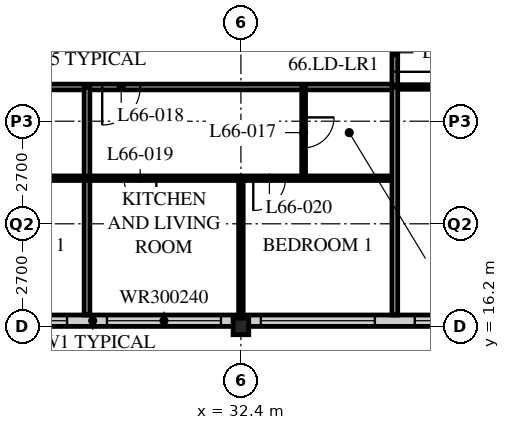
"""IFC4 building model, lengths in metres.
Left out: names, types, materials, properties, quantities, classifications, styles, units other than length and angle.
Written with IfcOpenShell. Run it as: python <this file> out.ifc"""

import sys

from ifc_helpers import new_model, si_unit, direction, frame, frame_2d, origin, origin_2d, place, context, subcontext, project, spatial, rectangle, i_section, extrude, element, fill, save


model = new_model("IFC4")
c1 = context("Model", 3, precision=1e-05, world=origin(), true_north=direction((0.0, 1.0)))
c2 = subcontext(c1, "Body", "Model", "MODEL_VIEW")
j1 = project(units=[si_unit("LENGTHUNIT", "METRE"), si_unit("PLANEANGLEUNIT", "RADIAN")], contexts=[c1])
p1 = place(None, origin())
s1 = spatial("IfcSite", under=j1, at=p1, CompositionType="ELEMENT")
p2 = place(p1, origin())
s2 = spatial("IfcBuilding", under=s1, at=p2, CompositionType="ELEMENT")
p3 = place(p2, frame((0.0, 0.0, 258.0)))
s3 = spatial("IfcBuildingStorey", under=s2, at=p3, CompositionType="ELEMENT", Elevation=258.0)
p4 = place(p3, frame((32.4, 16.2, 0.0), z_axis=(0.0, 0.0, 1.0), x_axis=(1.0, 0.0, 0.0)))
e1 = element("IfcColumn", 1, at=p4, inside=s3, PredefinedType="COLUMN", context=c2, shape_type="SweptSolid", body=[
    extrude(i_section(OverallWidth=0.412, OverallDepth=0.437, WebThickness=0.036, FlangeThickness=0.058, FilletRadius=0.015, at=origin_2d()), origin(), (0.0, 0.0, 1.0), 3.9),
])
p5 = place(p3, frame((8.4, 16.35, 0.0), z_axis=(0.0, 0.0, 1.0), x_axis=(1.0, 0.0, 0.0)))
e2 = element("IfcWall", 2, at=p5, inside=s3, PredefinedType="SOLIDWALL", context=c2, shape_type="SweptSolid", body=[
    extrude(rectangle(XDim=40.2, YDim=0.3, at=frame_2d((20.1, 0.0))), origin(), (0.0, 0.0, 1.0), 3.69),
])
p6 = place(p5, frame((0.225, 0.0, 0.6)))
e3 = element("IfcOpeningElement", 3, at=p6, cuts=e2, PredefinedType="OPENING", context=c2, shape_type="SweptSolid", body=[
    extrude(rectangle(XDim=3.0, YDim=2.4, at=frame_2d((1.5, 1.2))), frame((0.0, 0.16, 0.0), z_axis=(0.0, -1.0, 0.0), x_axis=(1.0, 0.0, 0.0)), (0.0, 0.0, 1.0), 0.32),
])
p7 = place(p5, frame((4.275, 0.0, 0.6)))
e4 = element("IfcOpeningElement", 4, at=p7, cuts=e2, PredefinedType="OPENING", context=c2, shape_type="SweptSolid", body=[
    extrude(rectangle(XDim=3.0, YDim=2.4, at=frame_2d((1.5, 1.2))), frame((0.0, 0.16, 0.0), z_axis=(0.0, -1.0, 0.0), x_axis=(1.0, 0.0, 0.0)), (0.0, 0.0, 1.0), 0.32),
])
p8 = place(p5, frame((8.325, 0.0, 0.6)))
e5 = element("IfcOpeningElement", 5, at=p8, cuts=e2, PredefinedType="OPENING", context=c2, shape_type="SweptSolid", body=[
    extrude(rectangle(XDim=3.0, YDim=2.4, at=frame_2d((1.5, 1.2))), frame((0.0, 0.16, 0.0), z_axis=(0.0, -1.0, 0.0), x_axis=(1.0, 0.0, 0.0)), (0.0, 0.0, 1.0), 0.32),
])
p9 = place(p5, frame((12.375, 0.0, 0.6)))
e6 = element("IfcOpeningElement", 6, at=p9, cuts=e2, PredefinedType="OPENING", context=c2, shape_type="SweptSolid", body=[
    extrude(rectangle(XDim=3.0, YDim=2.4, at=frame_2d((1.5, 1.2))), frame((0.0, 0.16, 0.0), z_axis=(0.0, -1.0, 0.0), x_axis=(1.0, 0.0, 0.0)), (0.0, 0.0, 1.0), 0.32),
])
p10 = place(p5, frame((16.425, 0.0, 0.6)))
e7 = element("IfcOpeningElement", 7, at=p10, cuts=e2, PredefinedType="OPENING", context=c2, shape_type="SweptSolid", body=[
    extrude(rectangle(XDim=3.0, YDim=2.4, at=frame_2d((1.5, 1.2))), frame((0.0, 0.16, 0.0), z_axis=(0.0, -1.0, 0.0), x_axis=(1.0, 0.0, 0.0)), (0.0, 0.0, 1.0), 0.32),
])
p11 = place(p5, frame((20.475, 0.0, 0.6)))
e8 = element("IfcOpeningElement", 8, at=p11, cuts=e2, PredefinedType="OPENING", context=c2, shape_type="SweptSolid", body=[
    extrude(rectangle(XDim=3.0, YDim=2.4, at=frame_2d((1.5, 1.2))), frame((0.0, 0.16, 0.0), z_axis=(0.0, -1.0, 0.0), x_axis=(1.0, 0.0, 0.0)), (0.0, 0.0, 1.0), 0.32),
])
p12 = place(p5, frame((24.525, 0.0, 0.6)))
e9 = element("IfcOpeningElement", 9, at=p12, cuts=e2, PredefinedType="OPENING", context=c2, shape_type="SweptSolid", body=[
    extrude(rectangle(XDim=3.0, YDim=2.4, at=frame_2d((1.5, 1.2))), frame((0.0, 0.16, 0.0), z_axis=(0.0, -1.0, 0.0), x_axis=(1.0, 0.0, 0.0)), (0.0, 0.0, 1.0), 0.32),
])
p13 = place(p5, frame((28.575, 0.0, 0.6)))
e10 = element("IfcOpeningElement", 10, at=p13, cuts=e2, PredefinedType="OPENING", context=c2, shape_type="SweptSolid", body=[
    extrude(rectangle(XDim=3.0, YDim=2.4, at=frame_2d((1.5, 1.2))), frame((0.0, 0.16, 0.0), z_axis=(0.0, -1.0, 0.0), x_axis=(1.0, 0.0, 0.0)), (0.0, 0.0, 1.0), 0.32),
])
p14 = place(p5, frame((32.625, 0.0, 0.6)))
e11 = element("IfcOpeningElement", 11, at=p14, cuts=e2, PredefinedType="OPENING", context=c2, shape_type="SweptSolid", body=[
    extrude(rectangle(XDim=3.0, YDim=2.4, at=frame_2d((1.5, 1.2))), frame((0.0, 0.16, 0.0), z_axis=(0.0, -1.0, 0.0), x_axis=(1.0, 0.0, 0.0)), (0.0, 0.0, 1.0), 0.32),
])
p15 = place(p5, frame((36.675, 0.0, 0.6)))
e12 = element("IfcOpeningElement", 12, at=p15, cuts=e2, PredefinedType="OPENING", context=c2, shape_type="SweptSolid", body=[
    extrude(rectangle(XDim=3.0, YDim=2.4, at=frame_2d((1.5, 1.2))), frame((0.0, 0.16, 0.0), z_axis=(0.0, -1.0, 0.0), x_axis=(1.0, 0.0, 0.0)), (0.0, 0.0, 1.0), 0.32),
])
p16 = place(p3, frame((8.1, 22.5, 0.0), z_axis=(0.0, 0.0, 1.0), x_axis=(1.0, 0.0, 0.0)))
e13 = element("IfcWall", 13, at=p16, inside=s3, PredefinedType="PARTITIONING", context=c2, shape_type="SweptSolid", body=[
    extrude(rectangle(XDim=28.35, YDim=0.15, at=frame_2d((14.175, 0.0))), origin(), (0.0, 0.0, 1.0), 3.69),
])
p17 = place(p16, frame((4.45, 0.0, 0.0)))
e14 = element("IfcOpeningElement", 14, at=p17, cuts=e13, PredefinedType="OPENING", context=c2, shape_type="SweptSolid", body=[
    extrude(rectangle(XDim=1.0, YDim=2.1, at=frame_2d((0.5, 1.05))), frame((0.0, 0.085, 0.0), z_axis=(0.0, -1.0, 0.0), x_axis=(1.0, 0.0, 0.0)), (0.0, 0.0, 1.0), 0.17),
])
p18 = place(p16, frame((12.55, 0.0, 0.0)))
e15 = element("IfcOpeningElement", 15, at=p18, cuts=e13, PredefinedType="OPENING", context=c2, shape_type="SweptSolid", body=[
    extrude(rectangle(XDim=1.0, YDim=2.1, at=frame_2d((0.5, 1.05))), frame((0.0, 0.085, 0.0), z_axis=(0.0, -1.0, 0.0), x_axis=(1.0, 0.0, 0.0)), (0.0, 0.0, 1.0), 0.17),
])
p19 = place(p16, frame((20.65, 0.0, 0.0)))
e16 = element("IfcOpeningElement", 16, at=p19, cuts=e13, PredefinedType="OPENING", context=c2, shape_type="SweptSolid", body=[
    extrude(rectangle(XDim=1.0, YDim=2.1, at=frame_2d((0.5, 1.05))), frame((0.0, 0.085, 0.0), z_axis=(0.0, -1.0, 0.0), x_axis=(1.0, 0.0, 0.0)), (0.0, 0.0, 1.0), 0.17),
])
p20 = place(p16, frame((2.625, 0.0, 0.0)))
e17 = element("IfcOpeningElement", 17, at=p20, cuts=e13, PredefinedType="OPENING", context=c2, shape_type="SweptSolid", body=[
    extrude(rectangle(XDim=1.0, YDim=2.1, at=frame_2d((0.5, 1.05))), frame((0.0, 0.085, 0.0), z_axis=(0.0, -1.0, 0.0), x_axis=(1.0, 0.0, 0.0)), (0.0, 0.0, 1.0), 0.17),
])
p21 = place(p3, frame((36.45, 22.5, 0.0), z_axis=(0.0, 0.0, 1.0), x_axis=(0.0, 1.0, 0.0)))
e18 = element("IfcWall", 18, at=p21, inside=s3, PredefinedType="PARTITIONING", context=c2, shape_type="SweptSolid", body=[
    extrude(rectangle(XDim=1.8, YDim=0.15, at=frame_2d((0.9, 0.0))), origin(), (0.0, 0.0, 1.0), 3.69),
])
p22 = place(p21, frame((0.4, 0.0, 0.0)))
e19 = element("IfcOpeningElement", 19, at=p22, cuts=e18, PredefinedType="OPENING", context=c2, shape_type="SweptSolid", body=[
    extrude(rectangle(XDim=1.0, YDim=2.1, at=frame_2d((0.5, 1.05))), frame((0.0, 0.085, 0.0), z_axis=(0.0, -1.0, 0.0), x_axis=(1.0, 0.0, 0.0)), (0.0, 0.0, 1.0), 0.17),
])
p23 = place(p3, frame((28.35, 22.5, 0.0), z_axis=(0.0, 0.0, 1.0), x_axis=(0.0, -1.0, 0.0)))
e20 = element("IfcWall", 20, at=p23, inside=s3, PredefinedType="PARTITIONING", context=c2, shape_type="SweptSolid", body=[
    extrude(rectangle(XDim=6.0, YDim=0.15, at=frame_2d((3.0, 0.0))), origin(), (0.0, 0.0, 1.0), 3.69),
])
p24 = place(p3, frame((34.05, 22.5, 0.0), z_axis=(0.0, 0.0, 1.0), x_axis=(0.0, -1.0, 0.0)))
e21 = element("IfcWall", 21, at=p24, inside=s3, PredefinedType="PARTITIONING", context=c2, shape_type="SweptSolid", body=[
    extrude(rectangle(XDim=2.4, YDim=0.1, at=frame_2d((1.2, 0.0))), origin(), (0.0, 0.0, 1.0), 3.69),
])
p25 = place(p24, frame((0.8, 0.0, 0.0)))
e22 = element("IfcOpeningElement", 22, at=p25, cuts=e21, PredefinedType="OPENING", context=c2, shape_type="SweptSolid", body=[
    extrude(rectangle(XDim=0.8, YDim=2.1, at=frame_2d((0.4, 1.05))), frame((0.0, 0.06, 0.0), z_axis=(0.0, -1.0, 0.0), x_axis=(1.0, 0.0, 0.0)), (0.0, 0.0, 1.0), 0.12),
])
p26 = place(p3, frame((32.4, 20.1, 0.0), z_axis=(0.0, 0.0, 1.0), x_axis=(0.0, -1.0, 0.0)))
e23 = element("IfcWall", 23, at=p26, inside=s3, PredefinedType="PARTITIONING", context=c2, shape_type="SweptSolid", body=[
    extrude(rectangle(XDim=3.6, YDim=0.12, at=frame_2d((1.8, 0.0))), origin(), (0.0, 0.0, 1.0), 3.078),
])
p27 = place(p3, frame((8.1, 20.1, 0.0), z_axis=(0.0, 0.0, 1.0), x_axis=(1.0, 0.0, 0.0)))
e24 = element("IfcWall", 24, at=p27, inside=s3, PredefinedType="PARTITIONING", context=c2, shape_type="SweptSolid", body=[
    extrude(rectangle(XDim=28.35, YDim=0.12, at=frame_2d((14.175, 0.0))), origin(), (0.0, 0.0, 1.0), 3.69),
])
p28 = place(p27, frame((5.025, 0.0, 0.0)))
e25 = element("IfcOpeningElement", 25, at=p28, cuts=e24, PredefinedType="OPENING", context=c2, shape_type="SweptSolid", body=[
    extrude(rectangle(XDim=0.85, YDim=2.1, at=frame_2d((0.425, 1.05))), frame((0.0, 0.07, 0.0), z_axis=(0.0, -1.0, 0.0), x_axis=(1.0, 0.0, 0.0)), (0.0, 0.0, 1.0), 0.14),
])
p29 = place(p27, frame((8.425, 0.0, 0.0)))
e26 = element("IfcOpeningElement", 26, at=p29, cuts=e24, PredefinedType="OPENING", context=c2, shape_type="SweptSolid", body=[
    extrude(rectangle(XDim=0.85, YDim=2.1, at=frame_2d((0.425, 1.05))), frame((0.0, 0.07, 0.0), z_axis=(0.0, -1.0, 0.0), x_axis=(1.0, 0.0, 0.0)), (0.0, 0.0, 1.0), 0.14),
])
p30 = place(p27, frame((13.125, 0.0, 0.0)))
e27 = element("IfcOpeningElement", 27, at=p30, cuts=e24, PredefinedType="OPENING", context=c2, shape_type="SweptSolid", body=[
    extrude(rectangle(XDim=0.85, YDim=2.1, at=frame_2d((0.425, 1.05))), frame((0.0, 0.07, 0.0), z_axis=(0.0, -1.0, 0.0), x_axis=(1.0, 0.0, 0.0)), (0.0, 0.0, 1.0), 0.14),
])
p31 = place(p27, frame((16.525, 0.0, 0.0)))
e28 = element("IfcOpeningElement", 28, at=p31, cuts=e24, PredefinedType="OPENING", context=c2, shape_type="SweptSolid", body=[
    extrude(rectangle(XDim=0.85, YDim=2.1, at=frame_2d((0.425, 1.05))), frame((0.0, 0.07, 0.0), z_axis=(0.0, -1.0, 0.0), x_axis=(1.0, 0.0, 0.0)), (0.0, 0.0, 1.0), 0.14),
])
p32 = place(p27, frame((21.225, 0.0, 0.0)))
e29 = element("IfcOpeningElement", 29, at=p32, cuts=e24, PredefinedType="OPENING", context=c2, shape_type="SweptSolid", body=[
    extrude(rectangle(XDim=0.85, YDim=2.1, at=frame_2d((0.425, 1.05))), frame((0.0, 0.07, 0.0), z_axis=(0.0, -1.0, 0.0), x_axis=(1.0, 0.0, 0.0)), (0.0, 0.0, 1.0), 0.14),
])
p33 = place(p27, frame((24.625, 0.0, 0.0)))
e30 = element("IfcOpeningElement", 30, at=p33, cuts=e24, PredefinedType="OPENING", context=c2, shape_type="SweptSolid", body=[
    extrude(rectangle(XDim=0.85, YDim=2.1, at=frame_2d((0.425, 1.05))), frame((0.0, 0.07, 0.0), z_axis=(0.0, -1.0, 0.0), x_axis=(1.0, 0.0, 0.0)), (0.0, 0.0, 1.0), 0.14),
])
p34 = place(p27, frame((2.725, 0.0, 0.0)))
e31 = element("IfcOpeningElement", 31, at=p34, cuts=e24, PredefinedType="OPENING", context=c2, shape_type="SweptSolid", body=[
    extrude(rectangle(XDim=0.85, YDim=2.1, at=frame_2d((0.425, 1.05))), frame((0.0, 0.07, 0.0), z_axis=(0.0, -1.0, 0.0), x_axis=(1.0, 0.0, 0.0)), (0.0, 0.0, 1.0), 0.14),
])
p35 = place(p3, frame((36.45, 22.5, 0.0), z_axis=(0.0, 0.0, 1.0), x_axis=(1.0, 0.0, 0.0)))
e32 = element("IfcWall", 32, at=p35, inside=s3, PredefinedType="PARTITIONING", context=c2, shape_type="SweptSolid", body=[
    extrude(rectangle(XDim=6.45, YDim=0.12, at=frame_2d((3.225, 0.0))), origin(), (0.0, 0.0, 1.0), 3.69),
])
p36 = place(p35, frame((2.8, 0.0, 0.0)))
e33 = element("IfcOpeningElement", 33, at=p36, cuts=e32, PredefinedType="OPENING", context=c2, shape_type="SweptSolid", body=[
    extrude(rectangle(XDim=0.85, YDim=2.1, at=frame_2d((0.425, 1.05))), frame((0.0, 0.07, 0.0), z_axis=(0.0, -1.0, 0.0), x_axis=(1.0, 0.0, 0.0)), (0.0, 0.0, 1.0), 0.14),
])
p37 = place(p3, frame((36.45, 16.5, 0.0), z_axis=(0.0, 0.0, 1.0), x_axis=(0.0, 1.0, 0.0)))
e34 = element("IfcWall", 34, at=p37, inside=s3, PredefinedType="PARTITIONING", context=c2, shape_type="SweptSolid", body=[
    extrude(rectangle(XDim=6.0, YDim=0.15, at=frame_2d((3.0, 0.0))), origin(), (0.0, 0.0, 1.0), 3.69),
])
p38 = place(p10, origin())
e35 = element("IfcWindow", 35, at=p38, inside=s3, PartitioningType="SINGLE_PANEL", PredefinedType="WINDOW", context=c2, shape_type="SweptSolid", body=[
    extrude(rectangle(XDim=3.0, YDim=2.4, at=frame_2d((1.5, 1.2))), frame((0.0, 0.03, 0.0), z_axis=(0.0, -1.0, 0.0), x_axis=(1.0, 0.0, 0.0)), (0.0, 0.0, 1.0), 0.06),
])
fill(e7, e35)
p39 = place(p11, origin())
e36 = element("IfcWindow", 36, at=p39, inside=s3, PartitioningType="SINGLE_PANEL", PredefinedType="WINDOW", context=c2, shape_type="SweptSolid", body=[
    extrude(rectangle(XDim=3.0, YDim=2.4, at=frame_2d((1.5, 1.2))), frame((0.0, 0.03, 0.0), z_axis=(0.0, -1.0, 0.0), x_axis=(1.0, 0.0, 0.0)), (0.0, 0.0, 1.0), 0.06),
])
fill(e8, e36)
p40 = place(p12, origin())
e37 = element("IfcWindow", 37, at=p40, inside=s3, PartitioningType="SINGLE_PANEL", PredefinedType="WINDOW", context=c2, shape_type="SweptSolid", body=[
    extrude(rectangle(XDim=3.0, YDim=2.4, at=frame_2d((1.5, 1.2))), frame((0.0, 0.03, 0.0), z_axis=(0.0, -1.0, 0.0), x_axis=(1.0, 0.0, 0.0)), (0.0, 0.0, 1.0), 0.06),
])
fill(e9, e37)
p41 = place(p13, origin())
e38 = element("IfcWindow", 38, at=p41, inside=s3, PartitioningType="SINGLE_PANEL", PredefinedType="WINDOW", context=c2, shape_type="SweptSolid", body=[
    extrude(rectangle(XDim=3.0, YDim=2.4, at=frame_2d((1.5, 1.2))), frame((0.0, 0.03, 0.0), z_axis=(0.0, -1.0, 0.0), x_axis=(1.0, 0.0, 0.0)), (0.0, 0.0, 1.0), 0.06),
])
fill(e10, e38)
p42 = place(p25, origin())
e39 = element("IfcDoor", 39, at=p42, inside=s3, OperationType="SINGLE_SWING_LEFT", PredefinedType="DOOR", context=c2, shape_type="SweptSolid", body=[
    extrude(rectangle(XDim=0.8, YDim=2.1, at=frame_2d((0.4, 1.05))), frame((0.0, 0.025, 0.0), z_axis=(0.0, -1.0, 0.0), x_axis=(1.0, 0.0, 0.0)), (0.0, 0.0, 1.0), 0.05),
])
fill(e22, e39)
p43 = place(p19, origin())
e40 = element("IfcDoor", 40, at=p43, inside=s3, OperationType="SINGLE_SWING_RIGHT", PredefinedType="DOOR", context=c2, shape_type="SweptSolid", body=[
    extrude(rectangle(XDim=1.0, YDim=2.1, at=frame_2d((0.5, 1.05))), frame((0.0, 0.025, 0.0), z_axis=(0.0, -1.0, 0.0), x_axis=(1.0, 0.0, 0.0)), (0.0, 0.0, 1.0), 0.05),
])
fill(e16, e40)
p44 = place(p32, origin())
e41 = element("IfcDoor", 41, at=p44, inside=s3, OperationType="SINGLE_SWING_LEFT", PredefinedType="DOOR", context=c2, shape_type="SweptSolid", body=[
    extrude(rectangle(XDim=0.85, YDim=2.1, at=frame_2d((0.425, 1.05))), frame((0.0, 0.025, 0.0), z_axis=(0.0, -1.0, 0.0), x_axis=(1.0, 0.0, 0.0)), (0.0, 0.0, 1.0), 0.05),
])
fill(e29, e41)
p45 = place(p33, origin())
e42 = element("IfcDoor", 42, at=p45, inside=s3, OperationType="SINGLE_SWING_RIGHT", PredefinedType="DOOR", context=c2, shape_type="SweptSolid", body=[
    extrude(rectangle(XDim=0.85, YDim=2.1, at=frame_2d((0.425, 1.05))), frame((0.0, 0.025, 0.0), z_axis=(0.0, -1.0, 0.0), x_axis=(1.0, 0.0, 0.0)), (0.0, 0.0, 1.0), 0.05),
])
fill(e30, e42)
p46 = place(p22, origin())
e43 = element("IfcDoor", 43, at=p46, inside=s3, OperationType="SINGLE_SWING_RIGHT", PredefinedType="DOOR", context=c2, shape_type="SweptSolid", body=[
    extrude(rectangle(XDim=1.0, YDim=2.1, at=frame_2d((0.5, 1.05))), frame((0.0, 0.025, 0.0), z_axis=(0.0, -1.0, 0.0), x_axis=(1.0, 0.0, 0.0)), (0.0, 0.0, 1.0), 0.05),
])
fill(e19, e43)
save(model, sys.argv[1])
